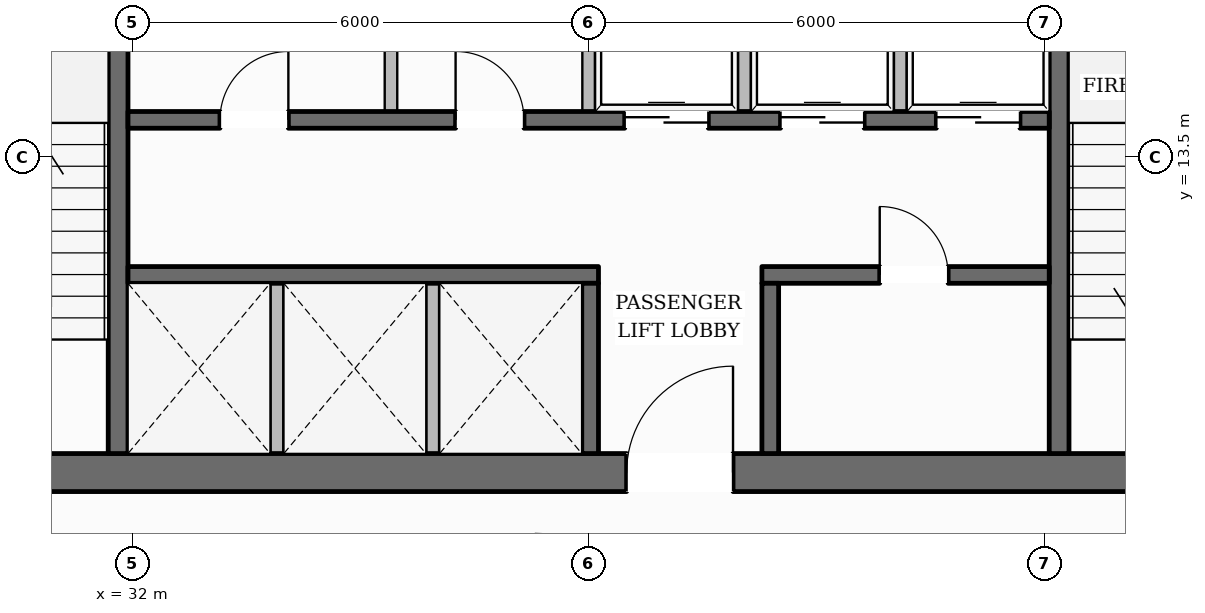
"""IFC4 building model, lengths in metres.
Left out: names, types, materials, properties, quantities, classifications, styles, units other than length and angle.
Written with IfcOpenShell. Run it as: python <this file> out.ifc"""

import sys

from ifc_helpers import new_model, si_unit, direction, frame, frame_2d, origin, place, context, subcontext, project, spatial, rectangle, extrude, element, fill, save


model = new_model("IFC4")
c1 = context("Model", 3, precision=1e-05, world=origin(), true_north=direction((0.0, 1.0)))
c2 = subcontext(c1, "Body", "Model", "MODEL_VIEW")
j1 = project(units=[si_unit("LENGTHUNIT", "METRE"), si_unit("PLANEANGLEUNIT", "RADIAN")], contexts=[c1])
p1 = place(None, origin())
s1 = spatial("IfcSite", under=j1, at=p1, CompositionType="ELEMENT")
p2 = place(p1, origin())
s2 = spatial("IfcBuilding", under=s1, at=p2, CompositionType="ELEMENT")
p3 = place(p2, frame((0.0, 0.0, 93.2)))
s3 = spatial("IfcBuildingStorey", under=s2, at=p3, CompositionType="ELEMENT", Elevation=93.2)
p4 = place(p3, frame((27.98, 9.35, 0.0), z_axis=(0.0, 0.0, 1.0), x_axis=(1.0, 0.0, 0.0)))
e1 = element("IfcWall", 1, at=p4, inside=s3, PredefinedType="SOLIDWALL", context=c2, shape_type="SweptSolid", body=[
    extrude(rectangle(XDim=20.04, YDim=0.5, at=frame_2d((10.02, 0.0))), origin(), (0.0, 0.0, 1.0), 3.6),
])
p5 = place(p4, frame((10.52, 0.0, 0.0)))
e2 = element("IfcOpeningElement", 2, at=p5, cuts=e1, PredefinedType="OPENING", context=c2, shape_type="SweptSolid", body=[
    extrude(rectangle(XDim=1.4, YDim=2.2, at=frame_2d((0.7, 1.1))), frame((0.0, 0.26, 0.0), z_axis=(0.0, -1.0, 0.0), x_axis=(1.0, 0.0, 0.0)), (0.0, 0.0, 1.0), 0.52),
])
p6 = place(p3, frame((31.81, 9.6, 0.0), z_axis=(0.0, 0.0, 1.0), x_axis=(0.0, 1.0, 0.0)))
e3 = element("IfcWall", 3, at=p6, inside=s3, PredefinedType="SHEAR", context=c2, shape_type="SweptSolid", body=[
    extrude(rectangle(XDim=13.0, YDim=0.26, at=frame_2d((6.5, 0.0))), origin(), (0.0, 0.0, 1.0), 3.6),
])
p7 = place(p6, frame((10.925, 0.0, 0.0)))
e4 = element("IfcOpeningElement", 4, at=p7, cuts=e3, PredefinedType="OPENING", context=c2, shape_type="SweptSolid", body=[
    extrude(rectangle(XDim=1.25, YDim=2.25, at=frame_2d((0.625, 1.125))), frame((0.0, 0.14, 0.0), z_axis=(0.0, -1.0, 0.0), x_axis=(1.0, 0.0, 0.0)), (0.0, 0.0, 1.0), 0.28),
])
p8 = place(p3, frame((44.19, 9.6, 0.0), z_axis=(0.0, 0.0, 1.0), x_axis=(0.0, 1.0, 0.0)))
e5 = element("IfcWall", 5, at=p8, inside=s3, PredefinedType="SHEAR", context=c2, shape_type="SweptSolid", body=[
    extrude(rectangle(XDim=13.0, YDim=0.26, at=frame_2d((6.5, 0.0))), origin(), (0.0, 0.0, 1.0), 3.6),
])
p9 = place(p8, frame((10.925, 0.0, 0.0)))
e6 = element("IfcOpeningElement", 6, at=p9, cuts=e5, PredefinedType="OPENING", context=c2, shape_type="SweptSolid", body=[
    extrude(rectangle(XDim=1.25, YDim=2.25, at=frame_2d((0.625, 1.125))), frame((0.0, 0.14, 0.0), z_axis=(0.0, -1.0, 0.0), x_axis=(1.0, 0.0, 0.0)), (0.0, 0.0, 1.0), 0.28),
])
p10 = place(p3, frame((31.94, 13.99, 0.0), z_axis=(0.0, 0.0, 1.0), x_axis=(1.0, 0.0, 0.0)))
e7 = element("IfcWall", 7, at=p10, inside=s3, PredefinedType="SOLIDWALL", context=c2, shape_type="SweptSolid", body=[
    extrude(rectangle(XDim=12.12, YDim=0.22, at=frame_2d((6.06, 0.0))), origin(), (0.0, 0.0, 1.0), 3.6),
])
p11 = place(p10, frame((1.21, 0.0, 0.0)))
e8 = element("IfcOpeningElement", 8, at=p11, cuts=e7, PredefinedType="OPENING", context=c2, shape_type="SweptSolid", body=[
    extrude(rectangle(XDim=0.9, YDim=2.1, at=frame_2d((0.45, 1.05))), frame((0.0, 0.12, 0.0), z_axis=(0.0, -1.0, 0.0), x_axis=(1.0, 0.0, 0.0)), (0.0, 0.0, 1.0), 0.24),
])
p12 = place(p10, frame((4.31, 0.0, 0.0)))
e9 = element("IfcOpeningElement", 9, at=p12, cuts=e7, PredefinedType="OPENING", context=c2, shape_type="SweptSolid", body=[
    extrude(rectangle(XDim=0.9, YDim=2.1, at=frame_2d((0.45, 1.05))), frame((0.0, 0.12, 0.0), z_axis=(0.0, -1.0, 0.0), x_axis=(1.0, 0.0, 0.0)), (0.0, 0.0, 1.0), 0.24),
])
p13 = place(p10, frame((6.535, 0.0, 0.0)))
e10 = element("IfcOpeningElement", 10, at=p13, cuts=e7, PredefinedType="OPENING", context=c2, shape_type="SweptSolid", body=[
    extrude(rectangle(XDim=1.1, YDim=2.2, at=frame_2d((0.55, 1.1))), frame((0.0, 0.12, 0.0), z_axis=(0.0, -1.0, 0.0), x_axis=(1.0, 0.0, 0.0)), (0.0, 0.0, 1.0), 0.24),
])
p14 = place(p10, frame((8.585, 0.0, 0.0)))
e11 = element("IfcOpeningElement", 11, at=p14, cuts=e7, PredefinedType="OPENING", context=c2, shape_type="SweptSolid", body=[
    extrude(rectangle(XDim=1.1, YDim=2.2, at=frame_2d((0.55, 1.1))), frame((0.0, 0.12, 0.0), z_axis=(0.0, -1.0, 0.0), x_axis=(1.0, 0.0, 0.0)), (0.0, 0.0, 1.0), 0.24),
])
p15 = place(p10, frame((10.635, 0.0, 0.0)))
e12 = element("IfcOpeningElement", 12, at=p15, cuts=e7, PredefinedType="OPENING", context=c2, shape_type="SweptSolid", body=[
    extrude(rectangle(XDim=1.1, YDim=2.2, at=frame_2d((0.55, 1.1))), frame((0.0, 0.12, 0.0), z_axis=(0.0, -1.0, 0.0), x_axis=(1.0, 0.0, 0.0)), (0.0, 0.0, 1.0), 0.24),
])
p16 = place(p3, frame((31.94, 11.95, 0.0), z_axis=(0.0, 0.0, 1.0), x_axis=(1.0, 0.0, 0.0)))
e13 = element("IfcWall", 13, at=p16, inside=s3, PredefinedType="SOLIDWALL", context=c2, shape_type="SweptSolid", body=[
    extrude(rectangle(XDim=6.19, YDim=0.22, at=frame_2d((3.095, 0.0))), origin(), (0.0, 0.0, 1.0), 3.6),
])
p17 = place(p3, frame((40.28, 11.95, 0.0), z_axis=(0.0, 0.0, 1.0), x_axis=(1.0, 0.0, 0.0)))
e14 = element("IfcWall", 14, at=p17, inside=s3, PredefinedType="SOLIDWALL", context=c2, shape_type="SweptSolid", body=[
    extrude(rectangle(XDim=3.78, YDim=0.22, at=frame_2d((1.89, 0.0))), origin(), (0.0, 0.0, 1.0), 3.6),
])
p18 = place(p17, frame((1.55, 0.0, 0.0)))
e15 = element("IfcOpeningElement", 15, at=p18, cuts=e14, PredefinedType="OPENING", context=c2, shape_type="SweptSolid", body=[
    extrude(rectangle(XDim=0.9, YDim=2.1, at=frame_2d((0.45, 1.05))), frame((0.0, 0.12, 0.0), z_axis=(0.0, -1.0, 0.0), x_axis=(1.0, 0.0, 0.0)), (0.0, 0.0, 1.0), 0.24),
])
for number, where, z_axis, x_axis in (
    (16, (38.02, 9.6, 0.0), (0.0, 0.0, 1.0), (0.0, 1.0, 0.0)),
    (17, (40.39, 9.6, 0.0), (0.0, 0.0, 1.0), (0.0, 1.0, 0.0)),
):
    element("IfcWall", number, at=place(p3, frame(where, z_axis=z_axis, x_axis=x_axis)), inside=s3, PredefinedType="SOLIDWALL", context=c2, shape_type="SweptSolid", body=[
        extrude(rectangle(XDim=2.24, YDim=0.22, at=frame_2d((1.12, 0.0))), origin(), (0.0, 0.0, 1.0), 3.6),
    ])
p19 = place(p3, frame((14.031, 13.485, 0.0), z_axis=(0.0, 0.0, 1.0), x_axis=(0.494642620698, 0.869096472084, 0.0)))
e18 = element("IfcWall", 18, at=p19, inside=s3, PredefinedType="STANDARD", context=c2, shape_type="SweptSolid", body=[
    extrude(rectangle(XDim=35.916, YDim=0.38, at=frame_2d((17.958, 0.0))), origin(), (0.0, 0.0, 1.0), 3.059),
])
p20 = place(p19, frame((31.748, 0.0, 0.65)))
e19 = element("IfcOpeningElement", 19, at=p20, cuts=e18, PredefinedType="OPENING", context=c2, shape_type="SweptSolid", body=[
    extrude(rectangle(XDim=1.55, YDim=1.75, at=frame_2d((0.775, 0.875))), frame((0.0, 0.2, 0.0), z_axis=(0.0, -1.0, 0.0), x_axis=(1.0, 0.0, 0.0)), (0.0, 0.0, 1.0), 0.4),
])
p21 = place(p19, frame((25.921, 0.0, 0.65)))
e20 = element("IfcOpeningElement", 20, at=p21, cuts=e18, PredefinedType="OPENING", context=c2, shape_type="SweptSolid", body=[
    extrude(rectangle(XDim=1.55, YDim=1.75, at=frame_2d((0.775, 0.875))), frame((0.0, 0.2, 0.0), z_axis=(0.0, -1.0, 0.0), x_axis=(1.0, 0.0, 0.0)), (0.0, 0.0, 1.0), 0.4),
])
p22 = place(p19, frame((8.439, 0.0, 0.65)))
e21 = element("IfcOpeningElement", 21, at=p22, cuts=e18, PredefinedType="OPENING", context=c2, shape_type="SweptSolid", body=[
    extrude(rectangle(XDim=1.55, YDim=1.75, at=frame_2d((0.775, 0.875))), frame((0.0, 0.2, 0.0), z_axis=(0.0, -1.0, 0.0), x_axis=(1.0, 0.0, 0.0)), (0.0, 0.0, 1.0), 0.4),
])
p23 = place(p19, frame((2.612, 0.0, 0.65)))
e22 = element("IfcOpeningElement", 22, at=p23, cuts=e18, PredefinedType="OPENING", context=c2, shape_type="SweptSolid", body=[
    extrude(rectangle(XDim=1.55, YDim=1.75, at=frame_2d((0.775, 0.875))), frame((0.0, 0.2, 0.0), z_axis=(0.0, -1.0, 0.0), x_axis=(1.0, 0.0, 0.0)), (0.0, 0.0, 1.0), 0.4),
])
p24 = place(p3, frame((44.203, 44.699, 0.0), z_axis=(0.0, 0.0, 1.0), x_axis=(0.494642620698, -0.869096472084, 0.0)))
e23 = element("IfcWall", 23, at=p24, inside=s3, PredefinedType="STANDARD", context=c2, shape_type="SweptSolid", body=[
    extrude(rectangle(XDim=35.916, YDim=0.38, at=frame_2d((17.958, 0.0))), origin(), (0.0, 0.0, 1.0), 3.059),
])
p25 = place(p24, frame((31.754, 0.0, 0.65)))
e24 = element("IfcOpeningElement", 24, at=p25, cuts=e23, PredefinedType="OPENING", context=c2, shape_type="SweptSolid", body=[
    extrude(rectangle(XDim=1.55, YDim=1.75, at=frame_2d((0.775, 0.875))), frame((0.0, 0.2, 0.0), z_axis=(0.0, -1.0, 0.0), x_axis=(1.0, 0.0, 0.0)), (0.0, 0.0, 1.0), 0.4),
])
p26 = place(p24, frame((25.927, 0.0, 0.65)))
e25 = element("IfcOpeningElement", 25, at=p26, cuts=e23, PredefinedType="OPENING", context=c2, shape_type="SweptSolid", body=[
    extrude(rectangle(XDim=1.55, YDim=1.75, at=frame_2d((0.775, 0.875))), frame((0.0, 0.2, 0.0), z_axis=(0.0, -1.0, 0.0), x_axis=(1.0, 0.0, 0.0)), (0.0, 0.0, 1.0), 0.4),
])
p27 = place(p24, frame((14.272, 0.0, 0.65)))
e26 = element("IfcOpeningElement", 26, at=p27, cuts=e23, PredefinedType="OPENING", context=c2, shape_type="SweptSolid", body=[
    extrude(rectangle(XDim=1.55, YDim=1.75, at=frame_2d((0.775, 0.875))), frame((0.0, 0.2, 0.0), z_axis=(0.0, -1.0, 0.0), x_axis=(1.0, 0.0, 0.0)), (0.0, 0.0, 1.0), 0.4),
])
p28 = place(p24, frame((8.445, 0.0, 0.65)))
e27 = element("IfcOpeningElement", 27, at=p28, cuts=e23, PredefinedType="OPENING", context=c2, shape_type="SweptSolid", body=[
    extrude(rectangle(XDim=1.55, YDim=1.75, at=frame_2d((0.775, 0.875))), frame((0.0, 0.2, 0.0), z_axis=(0.0, -1.0, 0.0), x_axis=(1.0, 0.0, 0.0)), (0.0, 0.0, 1.0), 0.4),
])
p29 = place(p24, frame((2.618, 0.0, 0.65)))
e28 = element("IfcOpeningElement", 28, at=p29, cuts=e23, PredefinedType="OPENING", context=c2, shape_type="SweptSolid", body=[
    extrude(rectangle(XDim=1.55, YDim=1.75, at=frame_2d((0.775, 0.875))), frame((0.0, 0.2, 0.0), z_axis=(0.0, -1.0, 0.0), x_axis=(1.0, 0.0, 0.0)), (0.0, 0.0, 1.0), 0.4),
])
for number, where, z_axis, x_axis in (
    (29, (33.9, 9.55, 0.0), (0.0, 0.0, 1.0), (0.0, 1.0, 0.0)),
    (30, (35.95, 9.55, 0.0), (0.0, 0.0, 1.0), (0.0, 1.0, 0.0)),
):
    element("IfcWall", number, at=place(p3, frame(where, z_axis=z_axis, x_axis=x_axis)), inside=s3, PredefinedType="PARTITIONING", context=c2, shape_type="SweptSolid", body=[
        extrude(rectangle(XDim=2.29, YDim=0.165, at=frame_2d((1.145, 0.0))), origin(), (0.0, 0.0, 1.0), 3.6),
    ])
for number, where, z_axis, x_axis in (
    (31, (38.0, 14.1, 0.0), (0.0, 0.0, 1.0), (0.0, 1.0, 0.0)),
    (32, (35.4, 14.1, 0.0), (0.0, 0.0, 1.0), (0.0, 1.0, 0.0)),
    (33, (40.05, 14.1, 0.0), (0.0, 0.0, 1.0), (0.0, 1.0, 0.0)),
    (34, (42.1, 14.1, 0.0), (0.0, 0.0, 1.0), (0.0, 1.0, 0.0)),
):
    element("IfcWall", number, at=place(p3, frame(where, z_axis=z_axis, x_axis=x_axis)), inside=s3, PredefinedType="PARTITIONING", context=c2, shape_type="SweptSolid", body=[
        extrude(rectangle(XDim=2.24, YDim=0.165, at=frame_2d((1.12, 0.0))), origin(), (0.0, 0.0, 1.0), 3.6),
    ])
p30 = place(p5, origin())
e35 = element("IfcDoor", 35, at=p30, inside=s3, OperationType="SINGLE_SWING_RIGHT", PredefinedType="DOOR", context=c2, shape_type="SweptSolid", body=[
    extrude(rectangle(XDim=1.4, YDim=2.2, at=frame_2d((0.7, 1.1))), frame((0.0, 0.025, 0.0), z_axis=(0.0, -1.0, 0.0), x_axis=(1.0, 0.0, 0.0)), (0.0, 0.0, 1.0), 0.05),
])
fill(e2, e35)
p31 = place(p11, origin())
e36 = element("IfcDoor", 36, at=p31, inside=s3, OperationType="SINGLE_SWING_RIGHT", PredefinedType="DOOR", context=c2, shape_type="SweptSolid", body=[
    extrude(rectangle(XDim=0.9, YDim=2.1, at=frame_2d((0.45, 1.05))), frame((0.0, 0.025, 0.0), z_axis=(0.0, -1.0, 0.0), x_axis=(1.0, 0.0, 0.0)), (0.0, 0.0, 1.0), 0.05),
])
fill(e8, e36)
p32 = place(p12, origin())
e37 = element("IfcDoor", 37, at=p32, inside=s3, OperationType="SINGLE_SWING_LEFT", PredefinedType="DOOR", context=c2, shape_type="SweptSolid", body=[
    extrude(rectangle(XDim=0.9, YDim=2.1, at=frame_2d((0.45, 1.05))), frame((0.0, 0.025, 0.0), z_axis=(0.0, -1.0, 0.0), x_axis=(1.0, 0.0, 0.0)), (0.0, 0.0, 1.0), 0.05),
])
fill(e9, e37)
p33 = place(p13, origin())
e38 = element("IfcDoor", 38, at=p33, inside=s3, OperationType="DOUBLE_DOOR_SLIDING", PredefinedType="DOOR", context=c2, shape_type="SweptSolid", body=[
    extrude(rectangle(XDim=1.1, YDim=2.2, at=frame_2d((0.55, 1.1))), frame((0.0, 0.025, 0.0), z_axis=(0.0, -1.0, 0.0), x_axis=(1.0, 0.0, 0.0)), (0.0, 0.0, 1.0), 0.05),
])
fill(e10, e38)
p34 = place(p14, origin())
e39 = element("IfcDoor", 39, at=p34, inside=s3, OperationType="DOUBLE_DOOR_SLIDING", PredefinedType="DOOR", context=c2, shape_type="SweptSolid", body=[
    extrude(rectangle(XDim=1.1, YDim=2.2, at=frame_2d((0.55, 1.1))), frame((0.0, 0.025, 0.0), z_axis=(0.0, -1.0, 0.0), x_axis=(1.0, 0.0, 0.0)), (0.0, 0.0, 1.0), 0.05),
])
fill(e11, e39)
p35 = place(p15, origin())
e40 = element("IfcDoor", 40, at=p35, inside=s3, OperationType="DOUBLE_DOOR_SLIDING", PredefinedType="DOOR", context=c2, shape_type="SweptSolid", body=[
    extrude(rectangle(XDim=1.1, YDim=2.2, at=frame_2d((0.55, 1.1))), frame((0.0, 0.025, 0.0), z_axis=(0.0, -1.0, 0.0), x_axis=(1.0, 0.0, 0.0)), (0.0, 0.0, 1.0), 0.05),
])
fill(e12, e40)
p36 = place(p18, origin())
e41 = element("IfcDoor", 41, at=p36, inside=s3, OperationType="SINGLE_SWING_LEFT", PredefinedType="DOOR", context=c2, shape_type="SweptSolid", body=[
    extrude(rectangle(XDim=0.9, YDim=2.1, at=frame_2d((0.45, 1.05))), frame((0.0, 0.025, 0.0), z_axis=(0.0, -1.0, 0.0), x_axis=(1.0, 0.0, 0.0)), (0.0, 0.0, 1.0), 0.05),
])
fill(e15, e41)
save(model, sys.argv[1])
